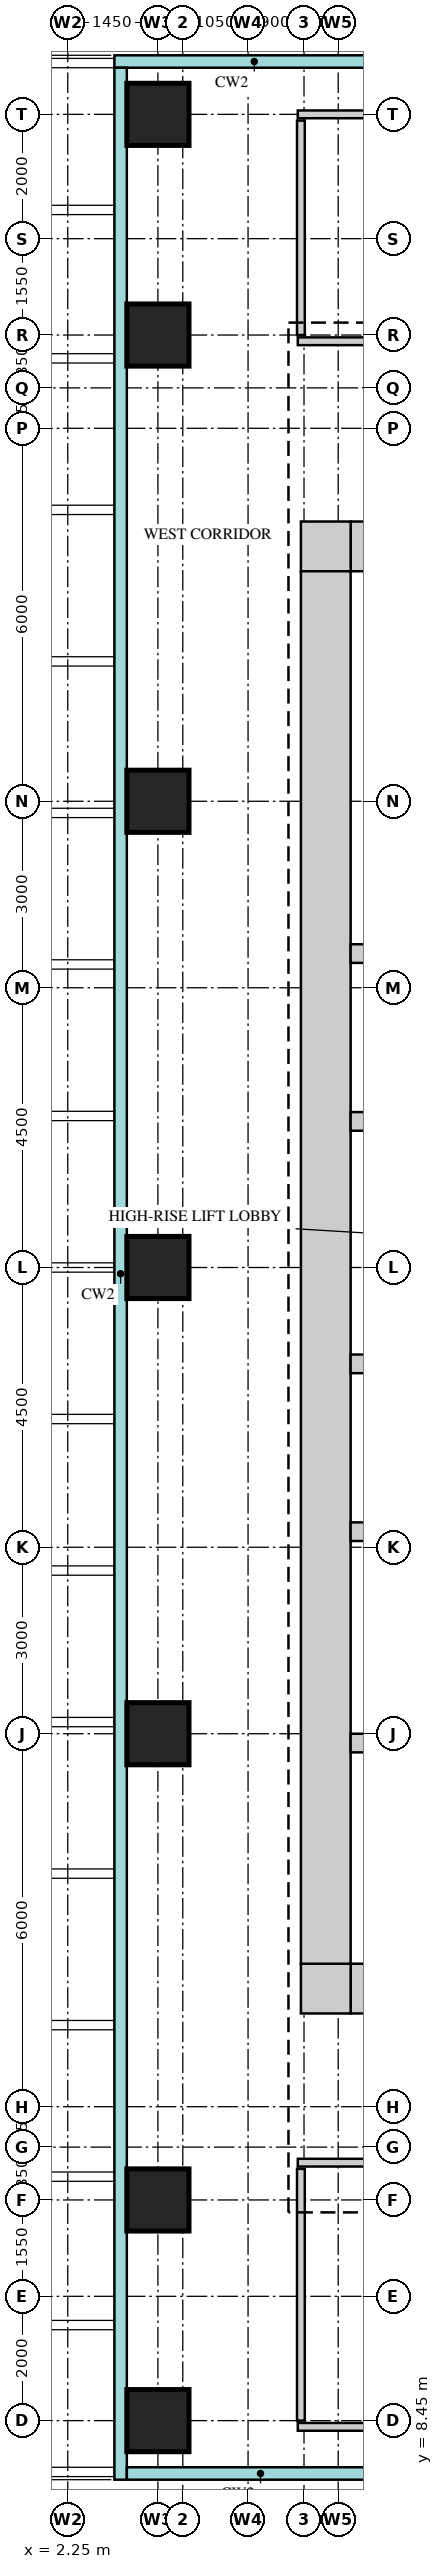
"""IFC4 building model, lengths in metres.
Left out: names, types, materials, properties, quantities, classifications, styles, units other than length and angle.
Written with IfcOpenShell. Run it as: python <this file> out.ifc"""

import sys

from ifc_helpers import new_model, si_unit, direction, frame, frame_2d, origin, origin_2d, place, context, subcontext, project, spatial, rectangle, extrude, source, transform, mapped, element, save


model = new_model("IFC4")
c1 = context("Model", 3, precision=1e-05, world=origin(), true_north=direction((0.0, 1.0)))
c2 = subcontext(c1, "Body", "Model", "MODEL_VIEW")
j1 = project(units=[si_unit("LENGTHUNIT", "METRE"), si_unit("PLANEANGLEUNIT", "RADIAN")], contexts=[c1])
p1 = place(None, origin())
s1 = spatial("IfcSite", under=j1, at=p1, CompositionType="ELEMENT")
p2 = place(p1, origin())
s2 = spatial("IfcBuilding", under=s1, at=p2, CompositionType="ELEMENT")
p3 = place(p2, frame((0.0, 0.0, 212.7)))
s3 = spatial("IfcBuildingStorey", under=s2, at=p3, CompositionType="ELEMENT", Elevation=212.7)
m1 = source(origin(), c2, "Body", "SweptSolid", [
    extrude(rectangle(XDim=13.4, YDim=0.8, at=frame_2d((6.7, 0.0))), origin(), (0.0, 0.0, 1.0), 3.75),
])
p4 = place(p3, frame((6.8, 38.6, 0.0), z_axis=(0.0, 0.0, 1.0), x_axis=(1.0, 0.0, 0.0)))
e1 = element("IfcWall", 1, at=p4, inside=s3, PredefinedType="SHEAR", context=c2, shape_type="MappedRepresentation", body=[
    mapped(m1, transform((0.0, 0.0, 0.0))),
])
m2 = source(origin(), c2, "Body", "SweptSolid", [
    extrude(rectangle(XDim=0.9, YDim=2.1, at=frame_2d((0.45, 1.05))), frame((0.0, 0.41, 0.0), z_axis=(0.0, -1.0, 0.0), x_axis=(1.0, 0.0, 0.0)), (0.0, 0.0, 1.0), 0.82),
])
p5 = place(p4, frame((2.9, 0.0, 0.0)))
e2 = element("IfcOpeningElement", 2, at=p5, cuts=e1, PredefinedType="OPENING", context=c2, shape_type="MappedRepresentation", body=[
    mapped(m2, transform((0.0, 0.0, 0.0))),
])
p6 = place(p4, frame((7.9, 0.0, 0.0)))
e3 = element("IfcOpeningElement", 3, at=p6, cuts=e1, PredefinedType="OPENING", context=c2, shape_type="MappedRepresentation", body=[
    mapped(m2, transform((0.0, 0.0, 0.0))),
])
p7 = place(p4, frame((11.25, 0.0, 0.0)))
e4 = element("IfcOpeningElement", 4, at=p7, cuts=e1, PredefinedType="OPENING", context=c2, shape_type="MappedRepresentation", body=[
    mapped(m2, transform((0.0, 0.0, 0.0))),
])
m3 = source(origin(), c2, "Body", "SweptSolid", [
    extrude(rectangle(XDim=0.8, YDim=0.8, at=frame_2d((0.4, 0.0))), origin(), (0.0, 0.0, 1.0), 3.75),
])
p8 = place(p3, frame((6.0, 38.6, 0.0), z_axis=(0.0, 0.0, 1.0), x_axis=(1.0, 0.0, 0.0)))
e5 = element("IfcWall", 5, at=p8, inside=s3, PredefinedType="SHEAR", context=c2, shape_type="MappedRepresentation", body=[
    mapped(m3, transform((0.0, 0.0, 0.0))),
])
p9 = place(p3, frame((6.8, 15.4, 0.0), z_axis=(0.0, 0.0, 1.0), x_axis=(1.0, 0.0, 0.0)))
e6 = element("IfcWall", 6, at=p9, inside=s3, PredefinedType="SHEAR", context=c2, shape_type="MappedRepresentation", body=[
    mapped(m1, transform((0.0, 0.0, 0.0))),
])
m4 = source(origin(), c2, "Body", "SweptSolid", [
    extrude(rectangle(XDim=1.2, YDim=2.1, at=frame_2d((0.6, 1.05))), frame((0.0, 0.41, 0.0), z_axis=(0.0, -1.0, 0.0), x_axis=(1.0, 0.0, 0.0)), (0.0, 0.0, 1.0), 0.82),
])
p10 = place(p9, frame((5.4, 0.0, 0.0)))
e7 = element("IfcOpeningElement", 7, at=p10, cuts=e6, PredefinedType="OPENING", context=c2, shape_type="MappedRepresentation", body=[
    mapped(m4, transform((0.0, 0.0, 0.0))),
])
p11 = place(p9, frame((2.05, 0.0, 0.0)))
e8 = element("IfcOpeningElement", 8, at=p11, cuts=e6, PredefinedType="OPENING", context=c2, shape_type="MappedRepresentation", body=[
    mapped(m4, transform((0.0, 0.0, 0.0))),
])
m5 = source(origin(), c2, "Body", "SweptSolid", [
    extrude(rectangle(XDim=1.0, YDim=2.1, at=frame_2d((0.5, 1.05))), frame((0.0, 0.41, 0.0), z_axis=(0.0, -1.0, 0.0), x_axis=(1.0, 0.0, 0.0)), (0.0, 0.0, 1.0), 0.82),
])
p12 = place(p9, frame((7.9, 0.0, 0.0)))
e9 = element("IfcOpeningElement", 9, at=p12, cuts=e6, PredefinedType="OPENING", context=c2, shape_type="MappedRepresentation", body=[
    mapped(m5, transform((0.0, 0.0, 0.0))),
])
p13 = place(p3, frame((6.0, 15.4, 0.0), z_axis=(0.0, 0.0, 1.0), x_axis=(1.0, 0.0, 0.0)))
e10 = element("IfcWall", 10, at=p13, inside=s3, PredefinedType="SHEAR", context=c2, shape_type="MappedRepresentation", body=[
    mapped(m3, transform((0.0, 0.0, 0.0))),
])
m6 = source(origin(), c2, "Body", "SweptSolid", [
    extrude(rectangle(XDim=22.4, YDim=0.8, at=frame_2d((11.2, 0.0))), origin(), (0.0, 0.0, 1.0), 3.75),
])
p14 = place(p3, frame((6.4, 15.8, 0.0), z_axis=(0.0, 0.0, 1.0), x_axis=(0.0, 1.0, 0.0)))
e11 = element("IfcWall", 11, at=p14, inside=s3, PredefinedType="SHEAR", context=c2, shape_type="MappedRepresentation", body=[
    mapped(m6, transform((0.0, 0.0, 0.0))),
])
m7 = source(origin(), c2, "Body", "SweptSolid", [
    extrude(rectangle(XDim=13.4, YDim=0.3, at=frame_2d((6.7, 0.0))), origin(), (0.0, 0.0, 1.0), 3.75),
])
p15 = place(p3, frame((6.8, 22.75, 0.0), z_axis=(0.0, 0.0, 1.0), x_axis=(1.0, 0.0, 0.0)))
e12 = element("IfcWall", 12, at=p15, inside=s3, PredefinedType="STANDARD", context=c2, shape_type="MappedRepresentation", body=[
    mapped(m7, transform((0.0, 0.0, 0.0))),
])
m8 = source(origin(), c2, "Body", "SweptSolid", [
    extrude(rectangle(XDim=9.275, YDim=0.3, at=frame_2d((4.637, 0.0))), origin(), (0.0, 0.0, 1.0), 3.75),
])
p16 = place(p3, frame((6.8, 19.35, 0.0), z_axis=(0.0, 0.0, 1.0), x_axis=(1.0, 0.0, 0.0)))
e13 = element("IfcWall", 13, at=p16, inside=s3, PredefinedType="STANDARD", context=c2, shape_type="MappedRepresentation", body=[
    mapped(m8, transform((0.0, 0.0, 0.0))),
])
m9 = source(origin(), c2, "Body", "SweptSolid", [
    extrude(rectangle(XDim=1.2, YDim=2.1, at=frame_2d((0.6, 1.05))), frame((0.0, 0.16, 0.0), z_axis=(0.0, -1.0, 0.0), x_axis=(1.0, 0.0, 0.0)), (0.0, 0.0, 1.0), 0.32),
])
p17 = place(p16, frame((0.85, 0.0, 0.0)))
e14 = element("IfcOpeningElement", 14, at=p17, cuts=e13, PredefinedType="OPENING", context=c2, shape_type="MappedRepresentation", body=[
    mapped(m9, transform((0.0, 0.0, 0.0))),
])
p18 = place(p16, frame((3.2, 0.0, 0.0)))
e15 = element("IfcOpeningElement", 15, at=p18, cuts=e13, PredefinedType="OPENING", context=c2, shape_type="MappedRepresentation", body=[
    mapped(m9, transform((0.0, 0.0, 0.0))),
])
p19 = place(p16, frame((5.45, 0.0, 0.0)))
e16 = element("IfcOpeningElement", 16, at=p19, cuts=e13, PredefinedType="OPENING", context=c2, shape_type="MappedRepresentation", body=[
    mapped(m9, transform((0.0, 0.0, 0.0))),
])
p20 = place(p16, frame((7.6, 0.0, 0.0)))
e17 = element("IfcOpeningElement", 17, at=p20, cuts=e13, PredefinedType="OPENING", context=c2, shape_type="MappedRepresentation", body=[
    mapped(m9, transform((0.0, 0.0, 0.0))),
])
p21 = place(p3, frame((6.8, 32.05, 0.0), z_axis=(0.0, 0.0, 1.0), x_axis=(1.0, 0.0, 0.0)))
e18 = element("IfcWall", 18, at=p21, inside=s3, PredefinedType="STANDARD", context=c2, shape_type="MappedRepresentation", body=[
    mapped(m7, transform((0.0, 0.0, 0.0))),
])
p22 = place(p3, frame((6.8, 29.35, 0.0), z_axis=(0.0, 0.0, 1.0), x_axis=(1.0, 0.0, 0.0)))
e19 = element("IfcWall", 19, at=p22, inside=s3, PredefinedType="STANDARD", context=c2, shape_type="MappedRepresentation", body=[
    mapped(m7, transform((0.0, 0.0, 0.0))),
])
p23 = place(p22, frame((0.95, 0.0, 0.0)))
e20 = element("IfcOpeningElement", 20, at=p23, cuts=e19, PredefinedType="OPENING", context=c2, shape_type="MappedRepresentation", body=[
    mapped(m9, transform((0.0, 0.0, 0.0))),
])
p24 = place(p22, frame((3.5, 0.0, 0.0)))
e21 = element("IfcOpeningElement", 21, at=p24, cuts=e19, PredefinedType="OPENING", context=c2, shape_type="MappedRepresentation", body=[
    mapped(m9, transform((0.0, 0.0, 0.0))),
])
p25 = place(p22, frame((6.05, 0.0, 0.0)))
e22 = element("IfcOpeningElement", 22, at=p25, cuts=e19, PredefinedType="OPENING", context=c2, shape_type="MappedRepresentation", body=[
    mapped(m9, transform((0.0, 0.0, 0.0))),
])
p26 = place(p22, frame((8.6, 0.0, 0.0)))
e23 = element("IfcOpeningElement", 23, at=p26, cuts=e19, PredefinedType="OPENING", context=c2, shape_type="MappedRepresentation", body=[
    mapped(m9, transform((0.0, 0.0, 0.0))),
])
p27 = place(p22, frame((11.15, 0.0, 0.0)))
e24 = element("IfcOpeningElement", 24, at=p27, cuts=e19, PredefinedType="OPENING", context=c2, shape_type="MappedRepresentation", body=[
    mapped(m9, transform((0.0, 0.0, 0.0))),
])
p28 = place(p3, frame((6.8, 25.45, 0.0), z_axis=(0.0, 0.0, 1.0), x_axis=(1.0, 0.0, 0.0)))
e25 = element("IfcWall", 25, at=p28, inside=s3, PredefinedType="STANDARD", context=c2, shape_type="MappedRepresentation", body=[
    mapped(m7, transform((0.0, 0.0, 0.0))),
])
p29 = place(p28, frame((0.95, 0.0, 0.0)))
e26 = element("IfcOpeningElement", 26, at=p29, cuts=e25, PredefinedType="OPENING", context=c2, shape_type="MappedRepresentation", body=[
    mapped(m9, transform((0.0, 0.0, 0.0))),
])
p30 = place(p28, frame((3.5, 0.0, 0.0)))
e27 = element("IfcOpeningElement", 27, at=p30, cuts=e25, PredefinedType="OPENING", context=c2, shape_type="MappedRepresentation", body=[
    mapped(m9, transform((0.0, 0.0, 0.0))),
])
p31 = place(p28, frame((6.05, 0.0, 0.0)))
e28 = element("IfcOpeningElement", 28, at=p31, cuts=e25, PredefinedType="OPENING", context=c2, shape_type="MappedRepresentation", body=[
    mapped(m9, transform((0.0, 0.0, 0.0))),
])
p32 = place(p28, frame((8.6, 0.0, 0.0)))
e29 = element("IfcOpeningElement", 29, at=p32, cuts=e25, PredefinedType="OPENING", context=c2, shape_type="MappedRepresentation", body=[
    mapped(m9, transform((0.0, 0.0, 0.0))),
])
p33 = place(p28, frame((11.15, 0.0, 0.0)))
e30 = element("IfcOpeningElement", 30, at=p33, cuts=e25, PredefinedType="OPENING", context=c2, shape_type="MappedRepresentation", body=[
    mapped(m9, transform((0.0, 0.0, 0.0))),
])
m10 = source(origin(), c2, "Body", "SweptSolid", [
    extrude(rectangle(XDim=1.0, YDim=1.0, at=origin_2d()), origin(), (0.0, 0.0, 1.0), 4.0),
])
for number, where, z_axis, x_axis in (
    (31, (3.7, 8.45, 0.0), (0.0, 0.0, 1.0), (1.0, 0.0, 0.0)),
    (32, (3.7, 12.0, 0.0), (0.0, 0.0, 1.0), (1.0, 0.0, 0.0)),
    (33, (3.7, 19.5, 0.0), (0.0, 0.0, 1.0), (1.0, 0.0, 0.0)),
    (34, (3.7, 27.0, 0.0), (0.0, 0.0, 1.0), (1.0, 0.0, 0.0)),
    (35, (3.7, 34.5, 0.0), (0.0, 0.0, 1.0), (1.0, 0.0, 0.0)),
    (36, (3.7, 42.0, 0.0), (0.0, 0.0, 1.0), (1.0, 0.0, 0.0)),
    (37, (3.7, 45.55, 0.0), (0.0, 0.0, 1.0), (1.0, 0.0, 0.0)),
):
    element("IfcColumn", number, at=place(p3, frame(where, z_axis=z_axis, x_axis=x_axis)), inside=s3, PredefinedType="COLUMN", context=c2, shape_type="MappedRepresentation", body=[
        mapped(m10, transform((0.0, 0.0, 0.0))),
    ])
m11 = source(origin(), c2, "Body", "SweptSolid", [
    extrude(rectangle(XDim=7.95, YDim=0.125, at=frame_2d((3.975, 0.0))), origin(), (0.0, 0.0, 1.0), 3.1),
])
p34 = place(p3, frame((5.95, 8.35, 0.0), z_axis=(0.0, 0.0, 1.0), x_axis=(1.0, 0.0, 0.0)))
e38 = element("IfcWall", 38, at=p34, inside=s3, PredefinedType="PARTITIONING", context=c2, shape_type="MappedRepresentation", body=[
    mapped(m11, transform((0.0, 0.0, 0.0))),
])
m12 = source(origin(), c2, "Body", "SweptSolid", [
    extrude(rectangle(XDim=0.9, YDim=2.1, at=frame_2d((0.45, 1.05))), frame((0.0, 0.073, 0.0), z_axis=(0.0, -1.0, 0.0), x_axis=(1.0, 0.0, 0.0)), (0.0, 0.0, 1.0), 0.145),
])
p35 = place(p34, frame((3.8, 0.0, 0.0)))
e39 = element("IfcOpeningElement", 39, at=p35, cuts=e38, PredefinedType="OPENING", context=c2, shape_type="MappedRepresentation", body=[
    mapped(m12, transform((0.0, 0.0, 0.0))),
])
m13 = source(origin(), c2, "Body", "SweptSolid", [
    extrude(rectangle(XDim=4.05, YDim=0.125, at=frame_2d((2.025, 0.0))), origin(), (0.0, 0.0, 1.0), 3.8),
])
p36 = place(p3, frame((6.0, 8.45, 0.0), z_axis=(0.0, 0.0, 1.0), x_axis=(0.0, 1.0, 0.0)))
e40 = element("IfcWall", 40, at=p36, inside=s3, PredefinedType="PARTITIONING", context=c2, shape_type="MappedRepresentation", body=[
    mapped(m13, transform((0.0, 0.0, 0.0))),
])
m14 = source(origin(), c2, "Body", "SweptSolid", [
    extrude(rectangle(XDim=8.0, YDim=0.125, at=frame_2d((4.0, 0.0))), origin(), (0.0, 0.0, 1.0), 3.8),
])
p37 = place(p3, frame((5.95, 12.6, 0.0), z_axis=(0.0, 0.0, 1.0), x_axis=(1.0, 0.0, 0.0)))
e41 = element("IfcWall", 41, at=p37, inside=s3, PredefinedType="PARTITIONING", context=c2, shape_type="MappedRepresentation", body=[
    mapped(m14, transform((0.0, 0.0, 0.0))),
])
m15 = source(origin(), c2, "Body", "SweptSolid", [
    extrude(rectangle(XDim=7.95, YDim=0.125, at=frame_2d((3.975, 0.0))), origin(), (0.0, 0.0, 1.0), 3.8),
])
p38 = place(p3, frame((5.95, 41.9, 0.0), z_axis=(0.0, 0.0, 1.0), x_axis=(1.0, 0.0, 0.0)))
e42 = element("IfcWall", 42, at=p38, inside=s3, PredefinedType="PARTITIONING", context=c2, shape_type="MappedRepresentation", body=[
    mapped(m15, transform((0.0, 0.0, 0.0))),
])
p39 = place(p38, frame((1.55, 0.0, 0.0)))
e43 = element("IfcOpeningElement", 43, at=p39, cuts=e42, PredefinedType="OPENING", context=c2, shape_type="MappedRepresentation", body=[
    mapped(m12, transform((0.0, 0.0, 0.0))),
])
p40 = place(p38, frame((5.65, 0.0, 0.0)))
e44 = element("IfcOpeningElement", 44, at=p40, cuts=e42, PredefinedType="OPENING", context=c2, shape_type="MappedRepresentation", body=[
    mapped(m12, transform((0.0, 0.0, 0.0))),
])
m16 = source(origin(), c2, "Body", "SweptSolid", [
    extrude(rectangle(XDim=3.45, YDim=0.125, at=frame_2d((1.725, 0.0))), origin(), (0.0, 0.0, 1.0), 3.8),
])
p41 = place(p3, frame((6.0, 42.0, 0.0), z_axis=(0.0, 0.0, 1.0), x_axis=(0.0, 1.0, 0.0)))
e45 = element("IfcWall", 45, at=p41, inside=s3, PredefinedType="PARTITIONING", context=c2, shape_type="MappedRepresentation", body=[
    mapped(m16, transform((0.0, 0.0, 0.0))),
])
p42 = place(p3, frame((5.95, 45.55, 0.0), z_axis=(0.0, 0.0, 1.0), x_axis=(1.0, 0.0, 0.0)))
e46 = element("IfcWall", 46, at=p42, inside=s3, PredefinedType="PARTITIONING", context=c2, shape_type="MappedRepresentation", body=[
    mapped(m11, transform((0.0, 0.0, 0.0))),
])
save(model, sys.argv[1])
